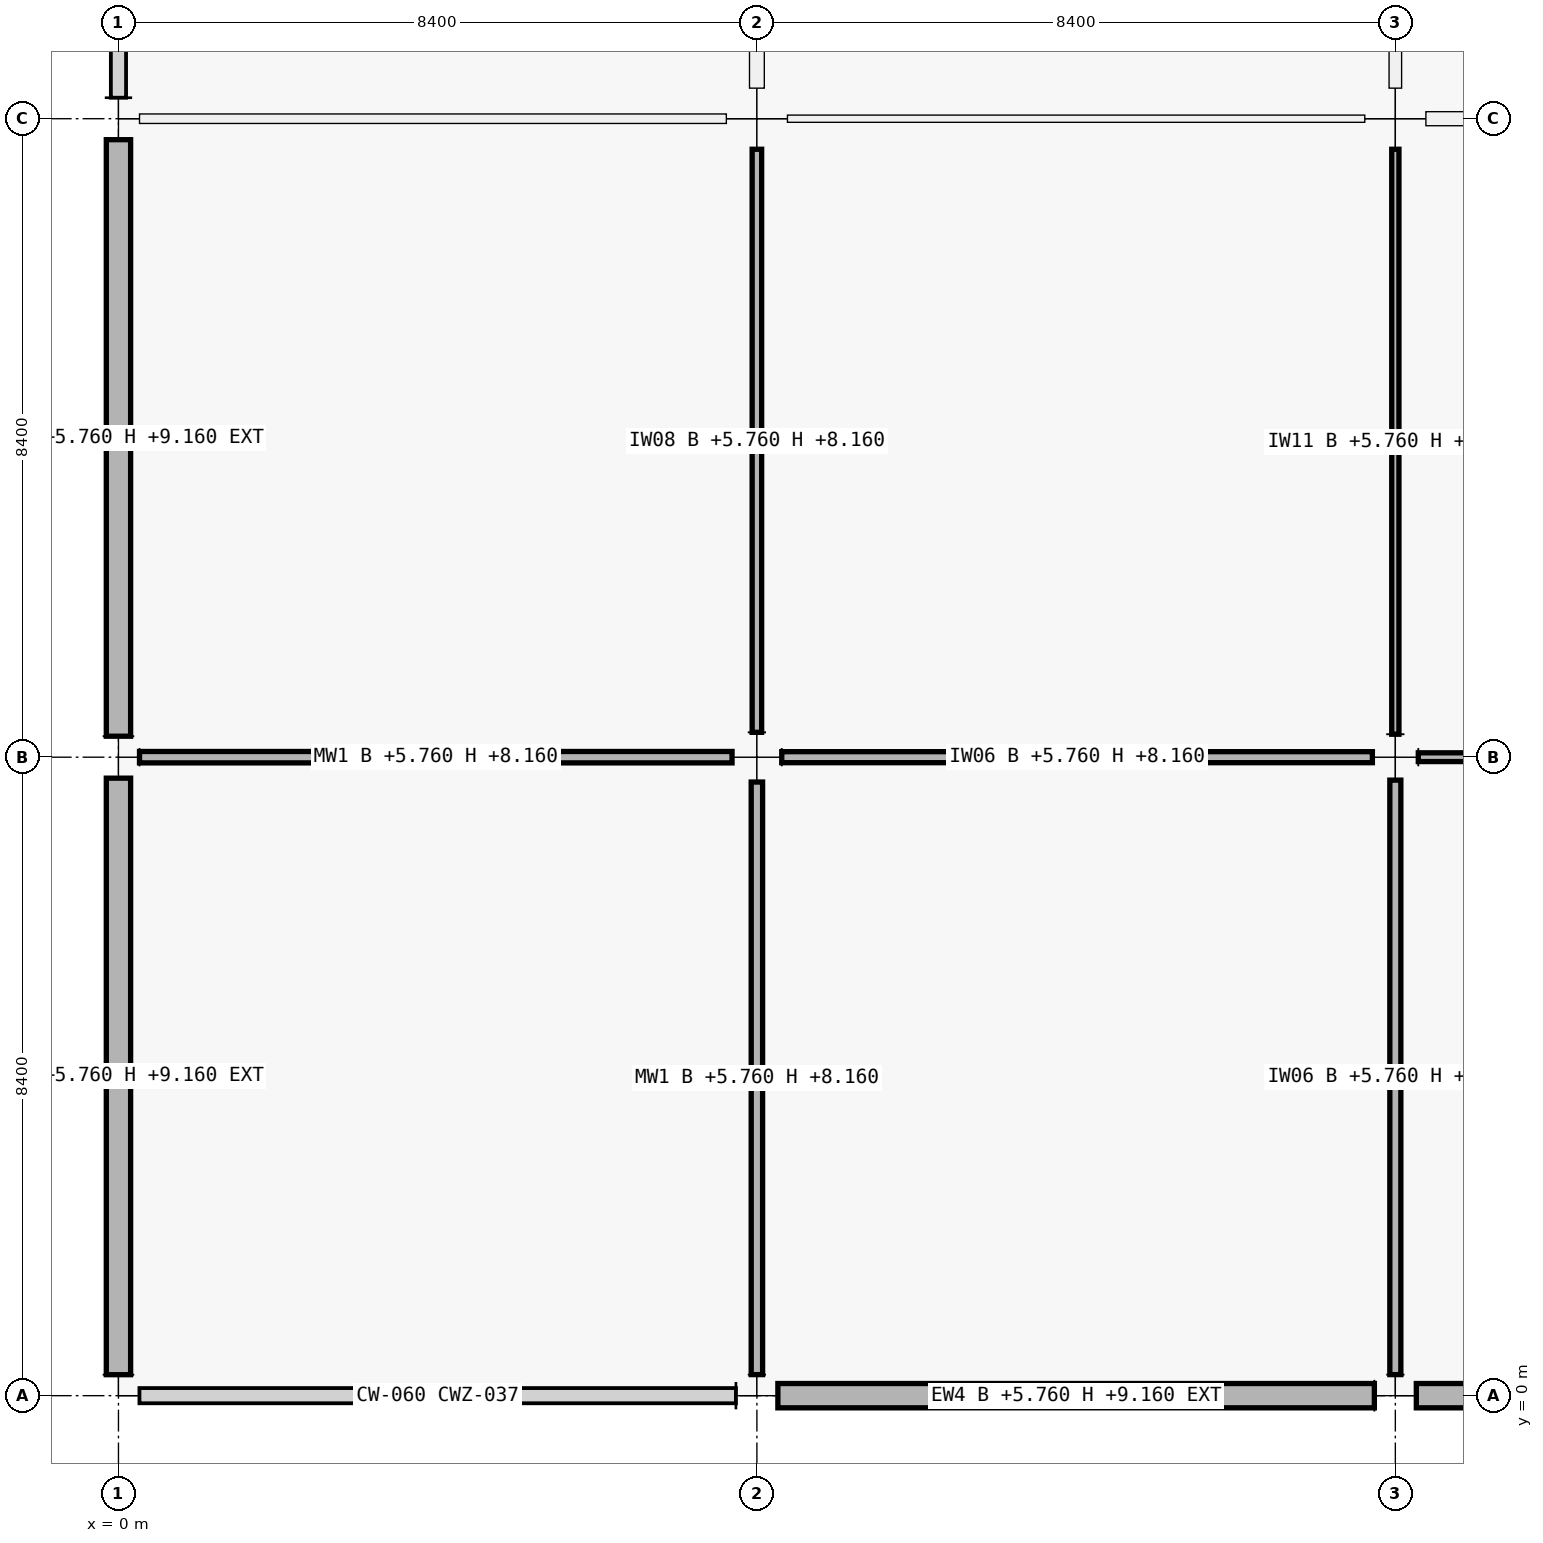
"""IFC4 building model, lengths in metres.
Left out: names, types, materials, properties, quantities, classifications, styles, units other than length and angle.
Written with IfcOpenShell. Run it as: python <this file> out.ifc"""

import sys

from ifc_helpers import new_model, si_unit, direction, frame, frame_2d, origin, origin_2d, place, context, subcontext, project, spatial, rectangle, extrude, element, fill, save


model = new_model("IFC4")
c1 = context("Model", 3, precision=1e-05, world=origin(), true_north=direction((0.0, 1.0)))
c2 = subcontext(c1, "Body", "Model", "MODEL_VIEW")
j1 = project(units=[si_unit("LENGTHUNIT", "METRE"), si_unit("PLANEANGLEUNIT", "RADIAN")], contexts=[c1])
p1 = place(None, origin())
s1 = spatial("IfcSite", under=j1, at=p1, CompositionType="ELEMENT")
p2 = place(p1, origin())
s2 = spatial("IfcBuilding", under=s1, at=p2, CompositionType="ELEMENT")
p3 = place(p2, frame((0.0, 0.0, 5.76)))
s3 = spatial("IfcBuildingStorey", under=s2, at=p3, CompositionType="ELEMENT", Elevation=5.76)
for number, where, z_axis, x_axis in (
    (1, (0.0, 0.0, 0.0), (0.0, 0.0, 1.0), (1.0, 0.0, 0.0)),
    (2, (0.0, 8.4, 0.0), (0.0, 0.0, 1.0), (1.0, 0.0, 0.0)),
    (3, (0.0, 16.8, 0.0), (0.0, 0.0, 1.0), (1.0, 0.0, 0.0)),
    (4, (8.4, 0.0, 0.0), (0.0, 0.0, 1.0), (1.0, 0.0, 0.0)),
):
    element("IfcColumn", number, at=place(p3, frame(where, z_axis=z_axis, x_axis=x_axis)), inside=s3, PredefinedType="COLUMN", context=c2, shape_type="SweptSolid", body=[
        extrude(rectangle(XDim=0.55, YDim=0.55, at=origin_2d()), origin(), (0.0, 0.0, 1.0), 4.2),
    ])
p4 = place(p3, frame((8.4, 8.4, 0.0), z_axis=(0.0, 0.0, 1.0), x_axis=(1.0, 0.0, 0.0)))
e5 = element("IfcColumn", 5, at=p4, inside=s3, PredefinedType="COLUMN", context=c2, shape_type="SweptSolid", body=[
    extrude(rectangle(XDim=0.65, YDim=0.65, at=origin_2d()), origin(), (0.0, 0.0, 1.0), 4.5),
])
p5 = place(p3, frame((8.4, 16.8, 0.0), z_axis=(0.0, 0.0, 1.0), x_axis=(1.0, 0.0, 0.0)))
e6 = element("IfcColumn", 6, at=p5, inside=s3, PredefinedType="COLUMN", context=c2, shape_type="SweptSolid", body=[
    extrude(rectangle(XDim=0.8, YDim=0.8, at=origin_2d()), origin(), (0.0, 0.0, 1.0), 4.5),
])
p6 = place(p3, frame((16.8, 0.0, 0.0), z_axis=(0.0, 0.0, 1.0), x_axis=(1.0, 0.0, 0.0)))
e7 = element("IfcColumn", 7, at=p6, inside=s3, PredefinedType="COLUMN", context=c2, shape_type="SweptSolid", body=[
    extrude(rectangle(XDim=0.55, YDim=0.55, at=origin_2d()), origin(), (0.0, 0.0, 1.0), 4.2),
])
p7 = place(p3, frame((16.8, 8.4, 0.0), z_axis=(0.0, 0.0, 1.0), x_axis=(1.0, 0.0, 0.0)))
e8 = element("IfcColumn", 8, at=p7, inside=s3, PredefinedType="COLUMN", context=c2, shape_type="SweptSolid", body=[
    extrude(rectangle(XDim=0.6, YDim=0.6, at=origin_2d()), origin(), (0.0, 0.0, 1.0), 4.5),
])
p8 = place(p3, frame((16.8, 16.8, 0.0), z_axis=(0.0, 0.0, 1.0), x_axis=(1.0, 0.0, 0.0)))
e9 = element("IfcColumn", 9, at=p8, inside=s3, PredefinedType="COLUMN", context=c2, shape_type="SweptSolid", body=[
    extrude(rectangle(XDim=0.8, YDim=0.8, at=origin_2d()), origin(), (0.0, 0.0, 1.0), 4.5),
])
p9 = place(p3, frame((0.0, 0.276, 0.0), z_axis=(0.0, 0.0, 1.0), x_axis=(0.0, 1.0, 0.0)))
e10 = element("IfcWall", 10, at=p9, inside=s3, PredefinedType="SOLIDWALL", context=c2, shape_type="SweptSolid", body=[
    extrude(rectangle(XDim=7.848, YDim=0.32, at=frame_2d((3.924, 0.0))), origin(), (0.0, 0.0, 1.0), 3.4),
])
p10 = place(p9, frame((2.524, 0.0, 0.9)))
e11 = element("IfcOpeningElement", 11, at=p10, cuts=e10, PredefinedType="OPENING", context=c2, shape_type="SweptSolid", body=[
    extrude(rectangle(XDim=2.8, YDim=1.75, at=frame_2d((1.4, 0.875))), frame((0.0, 0.16, 0.0), z_axis=(0.0, -1.0, 0.0), x_axis=(1.0, 0.0, 0.0)), (0.0, 0.0, 1.0), 0.32),
])
p11 = place(p3, frame((0.0, 8.676, 0.0), z_axis=(0.0, 0.0, 1.0), x_axis=(0.0, 1.0, 0.0)))
e12 = element("IfcWall", 12, at=p11, inside=s3, PredefinedType="SOLIDWALL", context=c2, shape_type="SweptSolid", body=[
    extrude(rectangle(XDim=7.848, YDim=0.32, at=frame_2d((3.924, 0.0))), origin(), (0.0, 0.0, 1.0), 3.4),
])
p12 = place(p11, frame((2.974, 0.0, 0.9)))
e13 = element("IfcOpeningElement", 13, at=p12, cuts=e12, PredefinedType="OPENING", context=c2, shape_type="SweptSolid", body=[
    extrude(rectangle(XDim=1.9, YDim=1.75, at=frame_2d((0.95, 0.875))), frame((0.0, 0.16, 0.0), z_axis=(0.0, -1.0, 0.0), x_axis=(1.0, 0.0, 0.0)), (0.0, 0.0, 1.0), 0.32),
])
p13 = place(p3, frame((16.524, 0.0, 0.0), z_axis=(0.0, 0.0, 1.0), x_axis=(-1.0, 0.0, 0.0)))
e14 = element("IfcWall", 14, at=p13, inside=s3, PredefinedType="SOLIDWALL", context=c2, shape_type="SweptSolid", body=[
    extrude(rectangle(XDim=7.848, YDim=0.32, at=frame_2d((3.924, 0.0))), origin(), (0.0, 0.0, 1.0), 3.4),
])
p14 = place(p13, frame((3.249, 0.0, 0.9)))
e15 = element("IfcOpeningElement", 15, at=p14, cuts=e14, PredefinedType="OPENING", context=c2, shape_type="SweptSolid", body=[
    extrude(rectangle(XDim=1.35, YDim=1.5, at=frame_2d((0.675, 0.75))), frame((0.0, 0.16, 0.0), z_axis=(0.0, -1.0, 0.0), x_axis=(1.0, 0.0, 0.0)), (0.0, 0.0, 1.0), 0.32),
])
p15 = place(p3, frame((24.924, 0.0, 0.0), z_axis=(0.0, 0.0, 1.0), x_axis=(-1.0, 0.0, 0.0)))
e16 = element("IfcWall", 16, at=p15, inside=s3, PredefinedType="SOLIDWALL", context=c2, shape_type="SweptSolid", body=[
    extrude(rectangle(XDim=7.848, YDim=0.32, at=frame_2d((3.924, 0.0))), origin(), (0.0, 0.0, 1.0), 3.4),
])
p16 = place(p15, frame((3.374, 0.0, 0.9)))
e17 = element("IfcOpeningElement", 17, at=p16, cuts=e16, PredefinedType="OPENING", context=c2, shape_type="SweptSolid", body=[
    extrude(rectangle(XDim=1.1, YDim=1.5, at=frame_2d((0.55, 0.75))), frame((0.0, 0.16, 0.0), z_axis=(0.0, -1.0, 0.0), x_axis=(1.0, 0.0, 0.0)), (0.0, 0.0, 1.0), 0.32),
])
p17 = place(p3, frame((0.277, 8.4, 0.0), z_axis=(0.0, 0.0, 1.0), x_axis=(1.0, 0.0, 0.0)))
e18 = element("IfcWall", 18, at=p17, inside=s3, PredefinedType="MOVABLE", context=c2, shape_type="SweptSolid", body=[
    extrude(rectangle(XDim=7.796, YDim=0.15, at=frame_2d((3.898, 0.0))), origin(), (0.0, 0.0, 1.0), 2.4),
])
p18 = place(p17, frame((3.358, 0.0, 0.0)))
e19 = element("IfcOpeningElement", 19, at=p18, cuts=e18, PredefinedType="OPENING", context=c2, shape_type="SweptSolid", body=[
    extrude(rectangle(XDim=1.08, YDim=2.22, at=frame_2d((0.54, 1.11))), frame((0.0, 0.075, 0.0), z_axis=(0.0, -1.0, 0.0), x_axis=(1.0, 0.0, 0.0)), (0.0, 0.0, 1.0), 0.15),
])
p19 = place(p3, frame((0.277, 16.8, 0.0), z_axis=(0.0, 0.0, 1.0), x_axis=(1.0, 0.0, 0.0)))
e20 = element("IfcWall", 20, at=p19, inside=s3, PredefinedType="PARTITIONING", context=c2, shape_type="SweptSolid", body=[
    extrude(rectangle(XDim=7.721, YDim=0.125, at=frame_2d((3.86, 0.0))), origin(), (0.0, 0.0, 1.0), 2.4),
])
p20 = place(p19, frame((3.33, 0.0, 0.0)))
e21 = element("IfcOpeningElement", 21, at=p20, cuts=e20, PredefinedType="OPENING", context=c2, shape_type="SweptSolid", body=[
    extrude(rectangle(XDim=1.06, YDim=2.22, at=frame_2d((0.53, 1.11))), frame((0.0, 0.062, 0.0), z_axis=(0.0, -1.0, 0.0), x_axis=(1.0, 0.0, 0.0)), (0.0, 0.0, 1.0), 0.125),
])
p21 = place(p3, frame((8.727, 8.4, 0.0), z_axis=(0.0, 0.0, 1.0), x_axis=(1.0, 0.0, 0.0)))
e22 = element("IfcWall", 22, at=p21, inside=s3, PredefinedType="PARTITIONING", context=c2, shape_type="SweptSolid", body=[
    extrude(rectangle(XDim=7.771, YDim=0.145, at=frame_2d((3.885, 0.0))), origin(), (0.0, 0.0, 1.0), 2.4),
])
p22 = place(p21, frame((3.415, 0.0, 0.0)))
e23 = element("IfcOpeningElement", 23, at=p22, cuts=e22, PredefinedType="OPENING", context=c2, shape_type="SweptSolid", body=[
    extrude(rectangle(XDim=0.94, YDim=2.15, at=frame_2d((0.47, 1.075))), frame((0.0, 0.073, 0.0), z_axis=(0.0, -1.0, 0.0), x_axis=(1.0, 0.0, 0.0)), (0.0, 0.0, 1.0), 0.145),
])
p23 = place(p3, frame((8.802, 16.8, 0.0), z_axis=(0.0, 0.0, 1.0), x_axis=(1.0, 0.0, 0.0)))
e24 = element("IfcWall", 24, at=p23, inside=s3, PredefinedType="PARTITIONING", context=c2, shape_type="SweptSolid", body=[
    extrude(rectangle(XDim=7.596, YDim=0.095, at=frame_2d((3.798, 0.0))), origin(), (0.0, 0.0, 1.0), 2.4),
])
p24 = place(p23, frame((3.258, 0.0, 0.0)))
e25 = element("IfcOpeningElement", 25, at=p24, cuts=e24, PredefinedType="OPENING", context=c2, shape_type="SweptSolid", body=[
    extrude(rectangle(XDim=1.08, YDim=2.22, at=frame_2d((0.54, 1.11))), frame((0.0, 0.047, 0.0), z_axis=(0.0, -1.0, 0.0), x_axis=(1.0, 0.0, 0.0)), (0.0, 0.0, 1.0), 0.095),
])
p25 = place(p3, frame((17.102, 8.4, 0.0), z_axis=(0.0, 0.0, 1.0), x_axis=(1.0, 0.0, 0.0)))
e26 = element("IfcWall", 26, at=p25, inside=s3, PredefinedType="PARTITIONING", context=c2, shape_type="SweptSolid", body=[
    extrude(rectangle(XDim=7.771, YDim=0.115, at=frame_2d((3.885, 0.0))), origin(), (0.0, 0.0, 1.0), 2.4),
])
p26 = place(p25, frame((3.361, 0.0, 0.0)))
e27 = element("IfcOpeningElement", 27, at=p26, cuts=e26, PredefinedType="OPENING", context=c2, shape_type="SweptSolid", body=[
    extrude(rectangle(XDim=1.05, YDim=2.12, at=frame_2d((0.525, 1.06))), frame((0.0, 0.058, 0.0), z_axis=(0.0, -1.0, 0.0), x_axis=(1.0, 0.0, 0.0)), (0.0, 0.0, 1.0), 0.115),
])
p27 = place(p3, frame((17.202, 16.8, 0.0), z_axis=(0.0, 0.0, 1.0), x_axis=(1.0, 0.0, 0.0)))
e28 = element("IfcWall", 28, at=p27, inside=s3, PredefinedType="PARTITIONING", context=c2, shape_type="SweptSolid", body=[
    extrude(rectangle(XDim=7.596, YDim=0.185, at=frame_2d((3.798, 0.0))), origin(), (0.0, 0.0, 1.0), 2.4),
])
p28 = place(p27, frame((3.268, 0.0, 0.0)))
e29 = element("IfcOpeningElement", 29, at=p28, cuts=e28, PredefinedType="OPENING", context=c2, shape_type="SweptSolid", body=[
    extrude(rectangle(XDim=1.06, YDim=2.22, at=frame_2d((0.53, 1.11))), frame((0.0, 0.093, 0.0), z_axis=(0.0, -1.0, 0.0), x_axis=(1.0, 0.0, 0.0)), (0.0, 0.0, 1.0), 0.185),
])
p29 = place(p3, frame((8.4, 0.277, 0.0), z_axis=(0.0, 0.0, 1.0), x_axis=(0.0, 1.0, 0.0)))
e30 = element("IfcWall", 30, at=p29, inside=s3, PredefinedType="MOVABLE", context=c2, shape_type="SweptSolid", body=[
    extrude(rectangle(XDim=7.796, YDim=0.15, at=frame_2d((3.898, 0.0))), origin(), (0.0, 0.0, 1.0), 2.4),
])
p30 = place(p29, frame((3.388, 0.0, 0.0)))
e31 = element("IfcOpeningElement", 31, at=p30, cuts=e30, PredefinedType="OPENING", context=c2, shape_type="SweptSolid", body=[
    extrude(rectangle(XDim=1.02, YDim=2.2, at=frame_2d((0.51, 1.1))), frame((0.0, 0.075, 0.0), z_axis=(0.0, -1.0, 0.0), x_axis=(1.0, 0.0, 0.0)), (0.0, 0.0, 1.0), 0.15),
])
p31 = place(p3, frame((8.4, 8.727, 0.0), z_axis=(0.0, 0.0, 1.0), x_axis=(0.0, 1.0, 0.0)))
e32 = element("IfcWall", 32, at=p31, inside=s3, PredefinedType="PARTITIONING", context=c2, shape_type="SweptSolid", body=[
    extrude(rectangle(XDim=7.671, YDim=0.125, at=frame_2d((3.835, 0.0))), origin(), (0.0, 0.0, 1.0), 2.4),
])
p32 = place(p31, frame((3.336, 0.0, 0.0)))
e33 = element("IfcOpeningElement", 33, at=p32, cuts=e32, PredefinedType="OPENING", context=c2, shape_type="SweptSolid", body=[
    extrude(rectangle(XDim=1.0, YDim=2.2, at=frame_2d((0.5, 1.1))), frame((0.0, 0.062, 0.0), z_axis=(0.0, -1.0, 0.0), x_axis=(1.0, 0.0, 0.0)), (0.0, 0.0, 1.0), 0.125),
])
p33 = place(p3, frame((8.4, 17.202, 0.0), z_axis=(0.0, 0.0, 1.0), x_axis=(0.0, 1.0, 0.0)))
e34 = element("IfcWall", 34, at=p33, inside=s3, PredefinedType="PARTITIONING", context=c2, shape_type="SweptSolid", body=[
    extrude(rectangle(XDim=7.596, YDim=0.195, at=frame_2d((3.798, 0.0))), origin(), (0.0, 0.0, 1.0), 2.4),
])
p34 = place(p33, frame((3.308, 0.0, 0.0)))
e35 = element("IfcOpeningElement", 35, at=p34, cuts=e34, PredefinedType="OPENING", context=c2, shape_type="SweptSolid", body=[
    extrude(rectangle(XDim=0.98, YDim=2.18, at=frame_2d((0.49, 1.09))), frame((0.0, 0.098, 0.0), z_axis=(0.0, -1.0, 0.0), x_axis=(1.0, 0.0, 0.0)), (0.0, 0.0, 1.0), 0.195),
])
p35 = place(p3, frame((16.8, 0.277, 0.0), z_axis=(0.0, 0.0, 1.0), x_axis=(0.0, 1.0, 0.0)))
e36 = element("IfcWall", 36, at=p35, inside=s3, PredefinedType="PARTITIONING", context=c2, shape_type="SweptSolid", body=[
    extrude(rectangle(XDim=7.821, YDim=0.145, at=frame_2d((3.91, 0.0))), origin(), (0.0, 0.0, 1.0), 2.4),
])
p36 = place(p35, frame((3.45, 0.0, 0.0)))
e37 = element("IfcOpeningElement", 37, at=p36, cuts=e36, PredefinedType="OPENING", context=c2, shape_type="SweptSolid", body=[
    extrude(rectangle(XDim=0.92, YDim=2.15, at=frame_2d((0.46, 1.075))), frame((0.0, 0.073, 0.0), z_axis=(0.0, -1.0, 0.0), x_axis=(1.0, 0.0, 0.0)), (0.0, 0.0, 1.0), 0.145),
])
p37 = place(p3, frame((16.8, 8.702, 0.0), z_axis=(0.0, 0.0, 1.0), x_axis=(0.0, 1.0, 0.0)))
e38 = element("IfcWall", 38, at=p37, inside=s3, PredefinedType="PARTITIONING", context=c2, shape_type="SweptSolid", body=[
    extrude(rectangle(XDim=7.696, YDim=0.095, at=frame_2d((3.848, 0.0))), origin(), (0.0, 0.0, 1.0), 2.4),
])
p38 = place(p37, frame((3.323, 0.0, 0.0)))
e39 = element("IfcOpeningElement", 39, at=p38, cuts=e38, PredefinedType="OPENING", context=c2, shape_type="SweptSolid", body=[
    extrude(rectangle(XDim=1.05, YDim=2.12, at=frame_2d((0.525, 1.06))), frame((0.0, 0.047, 0.0), z_axis=(0.0, -1.0, 0.0), x_axis=(1.0, 0.0, 0.0)), (0.0, 0.0, 1.0), 0.095),
])
p39 = place(p3, frame((16.8, 17.202, 0.0), z_axis=(0.0, 0.0, 1.0), x_axis=(0.0, 1.0, 0.0)))
e40 = element("IfcWall", 40, at=p39, inside=s3, PredefinedType="PARTITIONING", context=c2, shape_type="SweptSolid", body=[
    extrude(rectangle(XDim=7.596, YDim=0.165, at=frame_2d((3.798, 0.0))), origin(), (0.0, 0.0, 1.0), 2.4),
])
p40 = place(p39, frame((3.293, 0.0, 0.0)))
e41 = element("IfcOpeningElement", 41, at=p40, cuts=e40, PredefinedType="OPENING", context=c2, shape_type="SweptSolid", body=[
    extrude(rectangle(XDim=1.01, YDim=2.12, at=frame_2d((0.505, 1.06))), frame((0.0, 0.083, 0.0), z_axis=(0.0, -1.0, 0.0), x_axis=(1.0, 0.0, 0.0)), (0.0, 0.0, 1.0), 0.165),
])
p41 = place(p10, origin())
e42 = element("IfcWindow", 42, at=p41, inside=s3, PartitioningType="SINGLE_PANEL", PredefinedType="WINDOW", context=c2, shape_type="SweptSolid", body=[
    extrude(rectangle(XDim=2.8, YDim=1.75, at=frame_2d((1.4, 0.875))), frame((0.0, 0.03, 0.0), z_axis=(0.0, -1.0, 0.0), x_axis=(1.0, 0.0, 0.0)), (0.0, 0.0, 1.0), 0.06),
])
fill(e11, e42)
p42 = place(p12, origin())
e43 = element("IfcWindow", 43, at=p42, inside=s3, PartitioningType="SINGLE_PANEL", PredefinedType="WINDOW", context=c2, shape_type="SweptSolid", body=[
    extrude(rectangle(XDim=1.9, YDim=1.75, at=frame_2d((0.95, 0.875))), frame((0.0, 0.03, 0.0), z_axis=(0.0, -1.0, 0.0), x_axis=(1.0, 0.0, 0.0)), (0.0, 0.0, 1.0), 0.06),
])
fill(e13, e43)
p43 = place(p14, origin())
e44 = element("IfcWindow", 44, at=p43, inside=s3, PartitioningType="SINGLE_PANEL", PredefinedType="WINDOW", context=c2, shape_type="SweptSolid", body=[
    extrude(rectangle(XDim=1.35, YDim=1.5, at=frame_2d((0.675, 0.75))), frame((0.0, 0.03, 0.0), z_axis=(0.0, -1.0, 0.0), x_axis=(1.0, 0.0, 0.0)), (0.0, 0.0, 1.0), 0.06),
])
fill(e15, e44)
p44 = place(p18, origin())
e45 = element("IfcDoor", 45, at=p44, inside=s3, OperationType="SINGLE_SWING_LEFT", PredefinedType="DOOR", context=c2, shape_type="SweptSolid", body=[
    extrude(rectangle(XDim=1.08, YDim=2.22, at=frame_2d((0.54, 1.11))), frame((0.0, 0.025, 0.0), z_axis=(0.0, -1.0, 0.0), x_axis=(1.0, 0.0, 0.0)), (0.0, 0.0, 1.0), 0.05),
])
fill(e19, e45)
p45 = place(p20, origin())
e46 = element("IfcDoor", 46, at=p45, inside=s3, OperationType="SINGLE_SWING_RIGHT", PredefinedType="DOOR", context=c2, shape_type="SweptSolid", body=[
    extrude(rectangle(XDim=1.06, YDim=2.22, at=frame_2d((0.53, 1.11))), frame((0.0, 0.025, 0.0), z_axis=(0.0, -1.0, 0.0), x_axis=(1.0, 0.0, 0.0)), (0.0, 0.0, 1.0), 0.05),
])
fill(e21, e46)
p46 = place(p22, origin())
e47 = element("IfcDoor", 47, at=p46, inside=s3, OperationType="SINGLE_SWING_RIGHT", PredefinedType="DOOR", context=c2, shape_type="SweptSolid", body=[
    extrude(rectangle(XDim=0.94, YDim=2.15, at=frame_2d((0.47, 1.075))), frame((0.0, 0.025, 0.0), z_axis=(0.0, -1.0, 0.0), x_axis=(1.0, 0.0, 0.0)), (0.0, 0.0, 1.0), 0.05),
])
fill(e23, e47)
p47 = place(p24, origin())
e48 = element("IfcDoor", 48, at=p47, inside=s3, OperationType="SINGLE_SWING_RIGHT", PredefinedType="DOOR", context=c2, shape_type="SweptSolid", body=[
    extrude(rectangle(XDim=1.08, YDim=2.22, at=frame_2d((0.54, 1.11))), frame((0.0, 0.025, 0.0), z_axis=(0.0, -1.0, 0.0), x_axis=(1.0, 0.0, 0.0)), (0.0, 0.0, 1.0), 0.05),
])
fill(e25, e48)
p48 = place(p30, origin())
e49 = element("IfcDoor", 49, at=p48, inside=s3, OperationType="SINGLE_SWING_RIGHT", PredefinedType="DOOR", context=c2, shape_type="SweptSolid", body=[
    extrude(rectangle(XDim=1.02, YDim=2.2, at=frame_2d((0.51, 1.1))), frame((0.0, 0.025, 0.0), z_axis=(0.0, -1.0, 0.0), x_axis=(1.0, 0.0, 0.0)), (0.0, 0.0, 1.0), 0.05),
])
fill(e31, e49)
p49 = place(p32, origin())
e50 = element("IfcDoor", 50, at=p49, inside=s3, OperationType="SINGLE_SWING_LEFT", PredefinedType="DOOR", context=c2, shape_type="SweptSolid", body=[
    extrude(rectangle(XDim=1.0, YDim=2.2, at=frame_2d((0.5, 1.1))), frame((0.0, 0.025, 0.0), z_axis=(0.0, -1.0, 0.0), x_axis=(1.0, 0.0, 0.0)), (0.0, 0.0, 1.0), 0.05),
])
fill(e33, e50)
p50 = place(p36, origin())
e51 = element("IfcDoor", 51, at=p50, inside=s3, OperationType="SINGLE_SWING_LEFT", PredefinedType="DOOR", context=c2, shape_type="SweptSolid", body=[
    extrude(rectangle(XDim=0.92, YDim=2.15, at=frame_2d((0.46, 1.075))), frame((0.0, 0.025, 0.0), z_axis=(0.0, -1.0, 0.0), x_axis=(1.0, 0.0, 0.0)), (0.0, 0.0, 1.0), 0.05),
])
fill(e37, e51)
p51 = place(p38, origin())
e52 = element("IfcDoor", 52, at=p51, inside=s3, OperationType="SINGLE_SWING_RIGHT", PredefinedType="DOOR", context=c2, shape_type="SweptSolid", body=[
    extrude(rectangle(XDim=1.05, YDim=2.12, at=frame_2d((0.525, 1.06))), frame((0.0, 0.025, 0.0), z_axis=(0.0, -1.0, 0.0), x_axis=(1.0, 0.0, 0.0)), (0.0, 0.0, 1.0), 0.05),
])
fill(e39, e52)
save(model, sys.argv[1])
